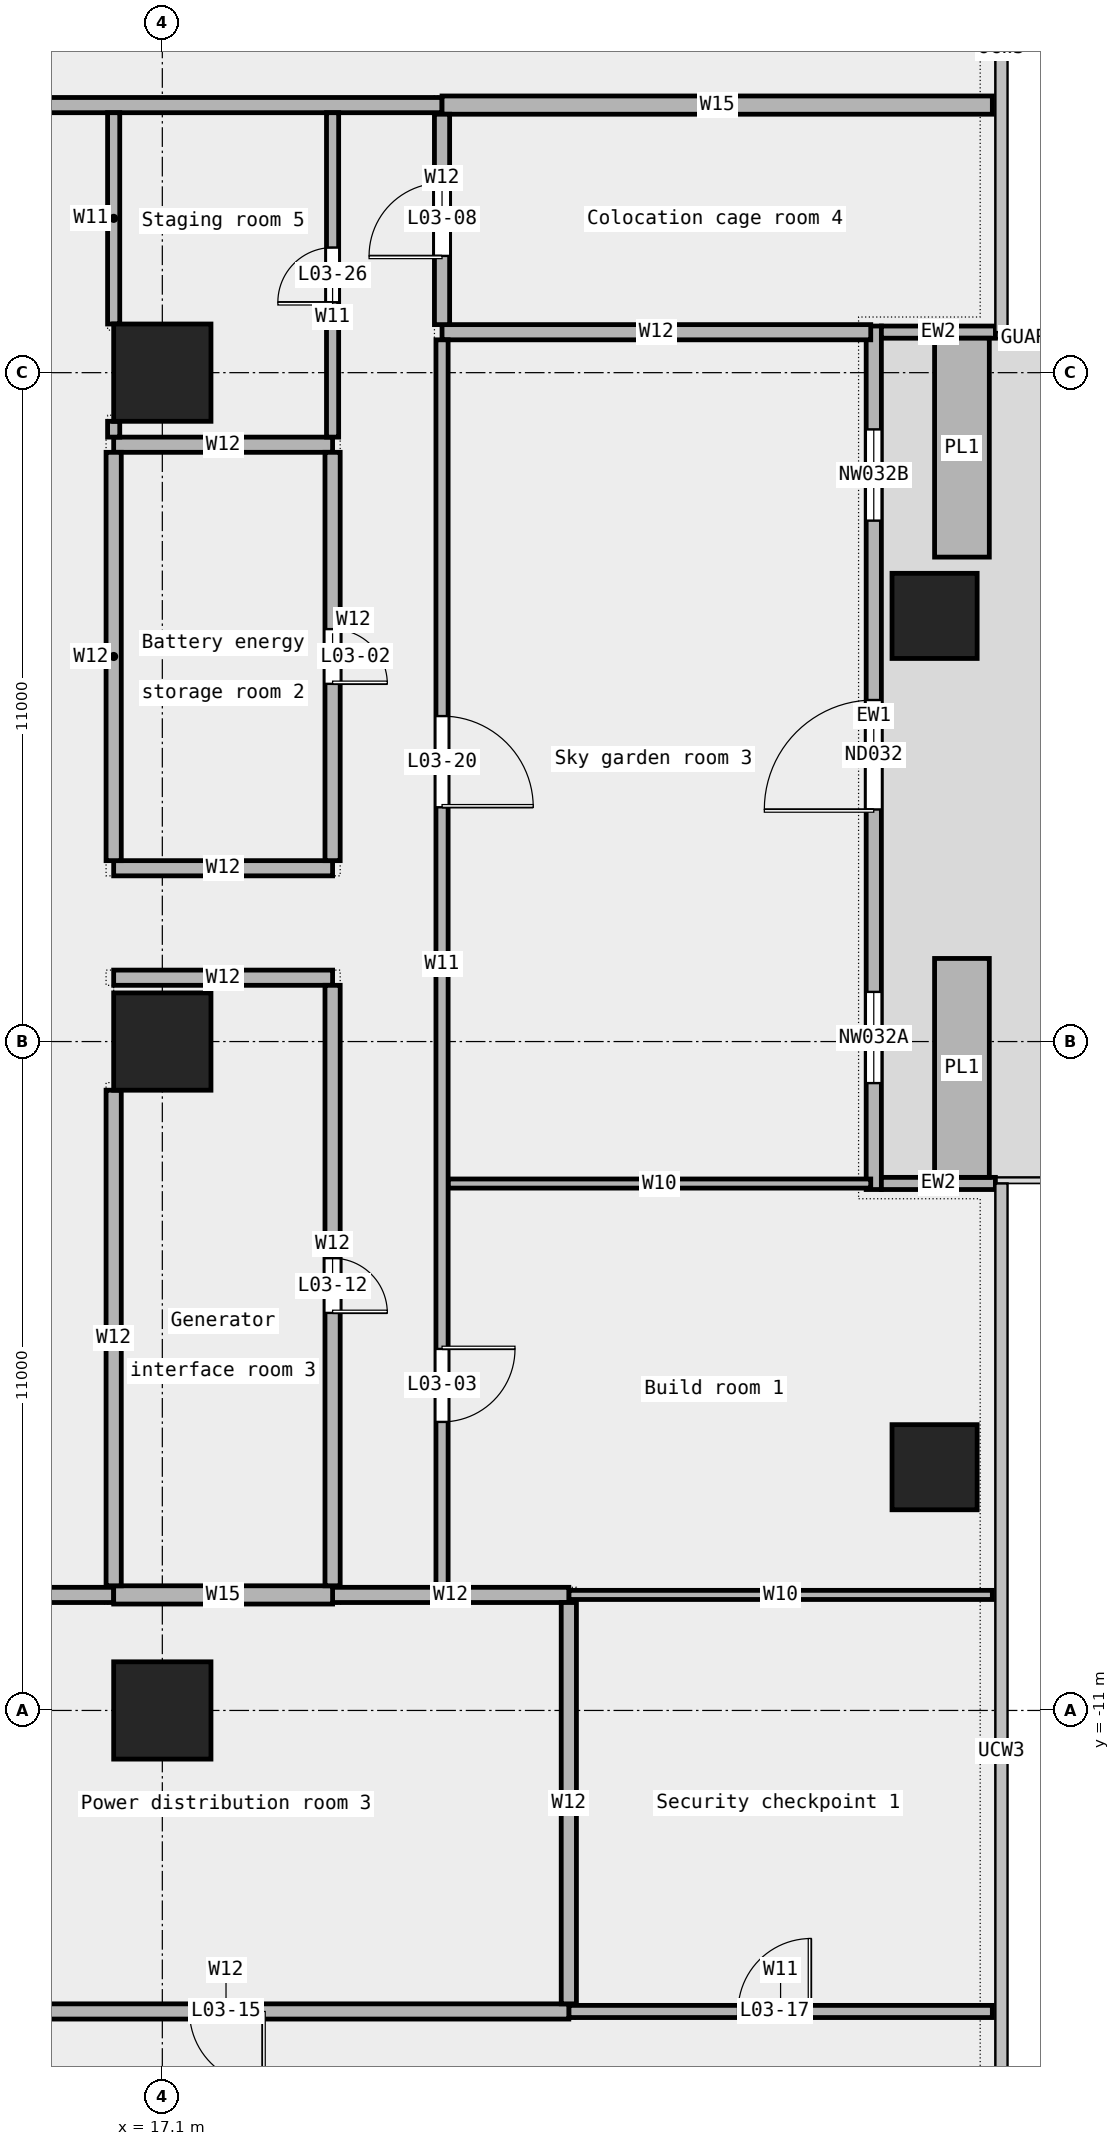
"""IFC4 building model, lengths in metres.
Left out: names, types, materials, properties, quantities, classifications, styles, units other than length and angle.
Written with IfcOpenShell. Run it as: python <this file> out.ifc"""

import sys

from ifc_helpers import new_model, si_unit, direction, frame, frame_2d, origin, origin_2d, place, context, subcontext, project, spatial, rectangle, extrude, element, fill, save


model = new_model("IFC4")
c1 = context("Model", 3, precision=1e-05, world=origin(), true_north=direction((0.0, 1.0)))
c2 = subcontext(c1, "Body", "Model", "MODEL_VIEW")
j1 = project(units=[si_unit("LENGTHUNIT", "METRE"), si_unit("PLANEANGLEUNIT", "RADIAN")], contexts=[c1])
p1 = place(None, origin())
s1 = spatial("IfcSite", under=j1, at=p1, CompositionType="ELEMENT")
p2 = place(p1, origin())
s2 = spatial("IfcBuilding", under=s1, at=p2, CompositionType="ELEMENT")
p3 = place(p2, frame((0.0, 0.0, 20.0)))
s3 = spatial("IfcBuildingStorey", under=s2, at=p3, CompositionType="ELEMENT", Elevation=20.0)
for number, where, z_axis, x_axis in (
    (1, (29.8, -7.0, 0.0), (0.0, 0.0, 1.0), (1.0, 0.0, 0.0)),
    (2, (29.8, 7.0, 0.0), (0.0, 0.0, 1.0), (1.0, 0.0, 0.0)),
):
    element("IfcColumn", number, at=place(p3, frame(where, z_axis=z_axis, x_axis=x_axis)), inside=s3, PredefinedType="COLUMN", context=c2, shape_type="SweptSolid", body=[
        extrude(rectangle(XDim=1.4, YDim=1.4, at=origin_2d()), origin(), (0.0, 0.0, 1.0), 5.0),
    ])
for number, where, z_axis, x_axis in (
    (3, (17.1, -11.0, 0.0), (0.0, 0.0, 1.0), (1.0, 0.0, 0.0)),
    (4, (17.1, 0.0, 0.0), (0.0, 0.0, 1.0), (1.0, 0.0, 0.0)),
    (5, (17.1, 11.0, 0.0), (0.0, 0.0, 1.0), (1.0, 0.0, 0.0)),
):
    element("IfcColumn", number, at=place(p3, frame(where, z_axis=z_axis, x_axis=x_axis)), inside=s3, PredefinedType="COLUMN", context=c2, shape_type="SweptSolid", body=[
        extrude(rectangle(XDim=1.6, YDim=1.6, at=origin_2d()), origin(), (0.0, 0.0, 1.0), 5.0),
    ])
p4 = place(p3, frame((28.8, -2.433, 0.0), z_axis=(0.0, 0.0, 1.0), x_axis=(0.0, 1.0, 0.0)))
e6 = element("IfcWall", 6, at=p4, inside=s3, PredefinedType="STANDARD", context=c2, shape_type="SweptSolid", body=[
    extrude(rectangle(XDim=14.2, YDim=0.25, at=frame_2d((7.1, 0.0))), origin(), (0.0, 0.0, 1.0), 5.0),
])
p5 = place(p4, frame((1.75, 0.0, 0.45)))
e7 = element("IfcOpeningElement", 7, at=p5, cuts=e6, PredefinedType="OPENING", context=c2, shape_type="SweptSolid", body=[
    extrude(rectangle(XDim=1.5, YDim=3.0, at=frame_2d((0.75, 1.5))), frame((0.0, 0.137, 0.0), z_axis=(0.0, -1.0, 0.0), x_axis=(1.0, 0.0, 0.0)), (0.0, 0.0, 1.0), 0.274),
])
p6 = place(p4, frame((6.25, 0.0, 0.0)))
e8 = element("IfcOpeningElement", 8, at=p6, cuts=e6, PredefinedType="OPENING", context=c2, shape_type="SweptSolid", body=[
    extrude(rectangle(XDim=1.8, YDim=2.4, at=frame_2d((0.9, 1.2))), frame((0.0, 0.137, 0.0), z_axis=(0.0, -1.0, 0.0), x_axis=(1.0, 0.0, 0.0)), (0.0, 0.0, 1.0), 0.274),
])
p7 = place(p4, frame((11.0, 0.0, 0.45)))
e9 = element("IfcOpeningElement", 9, at=p7, cuts=e6, PredefinedType="OPENING", context=c2, shape_type="SweptSolid", body=[
    extrude(rectangle(XDim=1.5, YDim=3.0, at=frame_2d((0.75, 1.5))), frame((0.0, 0.137, 0.0), z_axis=(0.0, -1.0, 0.0), x_axis=(1.0, 0.0, 0.0)), (0.0, 0.0, 1.0), 0.274),
])
for number, where, z_axis, x_axis in (
    (10, (30.8, -2.333, 0.0), (0.0, 0.0, 1.0), (-1.0, 0.0, 0.0)),
    (11, (30.8, 11.667, 0.0), (0.0, 0.0, 1.0), (-1.0, 0.0, 0.0)),
):
    element("IfcWall", number, at=place(p3, frame(where, z_axis=z_axis, x_axis=x_axis)), inside=s3, PredefinedType="STANDARD", context=c2, shape_type="SweptSolid", body=[
        extrude(rectangle(XDim=1.875, YDim=0.2, at=frame_2d((0.938, 0.0))), origin(), (0.0, 0.0, 1.0), 5.0),
    ])
for number, where, z_axis, x_axis in (
    (12, (30.25, -2.233, 0.0), (0.0, 0.0, 1.0), (0.0, 1.0, 0.0)),
    (13, (30.25, 7.967, 0.0), (0.0, 0.0, 1.0), (0.0, 1.0, 0.0)),
):
    element("IfcWall", number, at=place(p3, frame(where, z_axis=z_axis, x_axis=x_axis)), inside=s3, PredefinedType="STANDARD", context=c2, shape_type="SweptSolid", body=[
        extrude(rectangle(XDim=3.6, YDim=0.9, at=frame_2d((1.8, 0.0))), origin(), (0.0, 0.0, 1.0), 0.7),
    ])
p8 = place(p3, frame((23.785, -15.95, 0.0), z_axis=(0.0, 0.0, 1.0), x_axis=(1.0, 0.0, 0.0)))
e14 = element("IfcWall", 14, at=p8, inside=s3, PredefinedType="PARTITIONING", context=c2, shape_type="SweptSolid", body=[
    extrude(rectangle(XDim=6.965, YDim=0.2, at=frame_2d((3.482, 0.0))), origin(), (0.0, 0.0, 1.0), 5.0),
])
p9 = place(p8, frame((2.782, 0.0, 0.0)))
e15 = element("IfcOpeningElement", 15, at=p9, cuts=e14, PredefinedType="OPENING", context=c2, shape_type="SweptSolid", body=[
    extrude(rectangle(XDim=1.2, YDim=2.1, at=frame_2d((0.6, 1.05))), frame((0.0, 0.112, 0.0), z_axis=(0.0, -1.0, 0.0), x_axis=(1.0, 0.0, 0.0)), (0.0, 0.0, 1.0), 0.224),
])
p10 = place(p3, frame((12.51, -15.95, 0.0), z_axis=(0.0, 0.0, 1.0), x_axis=(1.0, 0.0, 0.0)))
e16 = element("IfcWall", 16, at=p10, inside=s3, PredefinedType="PARTITIONING", context=c2, shape_type="SweptSolid", body=[
    extrude(rectangle(XDim=11.275, YDim=0.25, at=frame_2d((5.637, 0.0))), origin(), (0.0, 0.0, 1.0), 5.0),
])
p11 = place(p10, frame((5.038, 0.0, 0.0)))
e17 = element("IfcOpeningElement", 17, at=p11, cuts=e16, PredefinedType="OPENING", context=c2, shape_type="SweptSolid", body=[
    extrude(rectangle(XDim=1.2, YDim=2.1, at=frame_2d((0.6, 1.05))), frame((0.0, 0.137, 0.0), z_axis=(0.0, -1.0, 0.0), x_axis=(1.0, 0.0, 0.0)), (0.0, 0.0, 1.0), 0.274),
])
p12 = place(p3, frame((23.785, -9.1, 0.0), z_axis=(0.0, 0.0, 1.0), x_axis=(1.0, 0.0, 0.0)))
e18 = element("IfcWall", 18, at=p12, inside=s3, PredefinedType="PARTITIONING", context=c2, shape_type="SweptSolid", body=[
    extrude(rectangle(XDim=6.965, YDim=0.15, at=frame_2d((3.482, 0.0))), origin(), (0.0, 0.0, 1.0), 5.0),
])
p13 = place(p3, frame((12.51, -9.1, 0.0), z_axis=(0.0, 0.0, 1.0), x_axis=(1.0, 0.0, 0.0)))
e19 = element("IfcWall", 19, at=p13, inside=s3, PredefinedType="PARTITIONING", context=c2, shape_type="SweptSolid", body=[
    extrude(rectangle(XDim=3.79, YDim=0.25, at=frame_2d((1.895, 0.0))), origin(), (0.0, 0.0, 1.0), 5.0),
])
p14 = place(p3, frame((19.9, -9.1, 0.0), z_axis=(0.0, 0.0, 1.0), x_axis=(1.0, 0.0, 0.0)))
e20 = element("IfcWall", 20, at=p14, inside=s3, PredefinedType="PARTITIONING", context=c2, shape_type="SweptSolid", body=[
    extrude(rectangle(XDim=3.885, YDim=0.25, at=frame_2d((1.942, 0.0))), origin(), (0.0, 0.0, 1.0), 5.0),
])
p15 = place(p3, frame((16.3, -9.1, 0.0), z_axis=(0.0, 0.0, 1.0), x_axis=(1.0, 0.0, 0.0)))
e21 = element("IfcWall", 21, at=p15, inside=s3, PredefinedType="PARTITIONING", context=c2, shape_type="SweptSolid", body=[
    extrude(rectangle(XDim=3.6, YDim=0.3, at=frame_2d((1.8, 0.0))), origin(), (0.0, 0.0, 1.0), 5.0),
])
p16 = place(p3, frame((21.8, -2.335, 0.0), z_axis=(0.0, 0.0, 1.0), x_axis=(1.0, 0.0, 0.0)))
e22 = element("IfcWall", 22, at=p16, inside=s3, PredefinedType="PARTITIONING", context=c2, shape_type="SweptSolid", body=[
    extrude(rectangle(XDim=6.95, YDim=0.15, at=frame_2d((3.475, 0.0))), origin(), (0.0, 0.0, 1.0), 5.0),
])
for number, where, z_axis, x_axis in (
    (23, (16.3, 1.05, 0.0), (0.0, 0.0, 1.0), (1.0, 0.0, 0.0)),
    (24, (16.3, 2.85, 0.0), (0.0, 0.0, 1.0), (1.0, 0.0, 0.0)),
    (25, (16.3, 9.815, 0.0), (0.0, 0.0, 1.0), (1.0, 0.0, 0.0)),
):
    element("IfcWall", number, at=place(p3, frame(where, z_axis=z_axis, x_axis=x_axis)), inside=s3, PredefinedType="PARTITIONING", context=c2, shape_type="SweptSolid", body=[
        extrude(rectangle(XDim=3.6, YDim=0.25, at=frame_2d((1.8, 0.0))), origin(), (0.0, 0.0, 1.0), 5.0),
    ])
p17 = place(p3, frame((21.7, 11.665, 0.0), z_axis=(0.0, 0.0, 1.0), x_axis=(1.0, 0.0, 0.0)))
e26 = element("IfcWall", 26, at=p17, inside=s3, PredefinedType="PARTITIONING", context=c2, shape_type="SweptSolid", body=[
    extrude(rectangle(XDim=7.05, YDim=0.25, at=frame_2d((3.525, 0.0))), origin(), (0.0, 0.0, 1.0), 5.0),
])
p18 = place(p3, frame((-1.33, 15.4, 0.0), z_axis=(0.0, 0.0, 1.0), x_axis=(1.0, 0.0, 0.0)))
e27 = element("IfcWall", 27, at=p18, inside=s3, PredefinedType="PARTITIONING", context=c2, shape_type="SweptSolid", body=[
    extrude(rectangle(XDim=23.03, YDim=0.25, at=frame_2d((11.515, 0.0))), origin(), (0.0, 0.0, 1.0), 5.0),
])
p19 = place(p18, frame((3.385, 0.0, 0.0)))
e28 = element("IfcOpeningElement", 28, at=p19, cuts=e27, PredefinedType="OPENING", context=c2, shape_type="SweptSolid", body=[
    extrude(rectangle(XDim=1.2, YDim=2.1, at=frame_2d((0.6, 1.05))), frame((0.0, 0.137, 0.0), z_axis=(0.0, -1.0, 0.0), x_axis=(1.0, 0.0, 0.0)), (0.0, 0.0, 1.0), 0.274),
])
p20 = place(p18, frame((11.9, 0.0, 0.0)))
e29 = element("IfcOpeningElement", 29, at=p20, cuts=e27, PredefinedType="OPENING", context=c2, shape_type="SweptSolid", body=[
    extrude(rectangle(XDim=1.8, YDim=2.1, at=frame_2d((0.9, 1.05))), frame((0.0, 0.137, 0.0), z_axis=(0.0, -1.0, 0.0), x_axis=(1.0, 0.0, 0.0)), (0.0, 0.0, 1.0), 0.274),
])
p21 = place(p3, frame((21.7, 15.4, 0.0), z_axis=(0.0, 0.0, 1.0), x_axis=(1.0, 0.0, 0.0)))
e30 = element("IfcWall", 30, at=p21, inside=s3, PredefinedType="PARTITIONING", context=c2, shape_type="SweptSolid", body=[
    extrude(rectangle(XDim=9.05, YDim=0.3, at=frame_2d((4.525, 0.0))), origin(), (0.0, 0.0, 1.0), 5.0),
])
p22 = place(p3, frame((16.3, 9.94, 0.0), z_axis=(0.0, 0.0, 1.0), x_axis=(0.0, 1.0, 0.0)))
e31 = element("IfcWall", 31, at=p22, inside=s3, PredefinedType="PARTITIONING", context=c2, shape_type="SweptSolid", body=[
    extrude(rectangle(XDim=0.26, YDim=0.2, at=frame_2d((0.13, 0.0))), origin(), (0.0, 0.0, 1.0), 5.0),
])
p23 = place(p3, frame((16.3, 11.8, 0.0), z_axis=(0.0, 0.0, 1.0), x_axis=(0.0, 1.0, 0.0)))
e32 = element("IfcWall", 32, at=p23, inside=s3, PredefinedType="PARTITIONING", context=c2, shape_type="SweptSolid", body=[
    extrude(rectangle(XDim=3.475, YDim=0.2, at=frame_2d((1.737, 0.0))), origin(), (0.0, 0.0, 1.0), 5.0),
])
p24 = place(p3, frame((16.3, -8.95, 0.0), z_axis=(0.0, 0.0, 1.0), x_axis=(0.0, 1.0, 0.0)))
e33 = element("IfcWall", 33, at=p24, inside=s3, PredefinedType="PARTITIONING", context=c2, shape_type="SweptSolid", body=[
    extrude(rectangle(XDim=8.15, YDim=0.25, at=frame_2d((4.075, 0.0))), origin(), (0.0, 0.0, 1.0), 5.0),
])
p25 = place(p3, frame((16.3, 2.975, 0.0), z_axis=(0.0, 0.0, 1.0), x_axis=(0.0, 1.0, 0.0)))
e34 = element("IfcWall", 34, at=p25, inside=s3, PredefinedType="PARTITIONING", context=c2, shape_type="SweptSolid", body=[
    extrude(rectangle(XDim=6.715, YDim=0.25, at=frame_2d((3.357, 0.0))), origin(), (0.0, 0.0, 1.0), 5.0),
])
p26 = place(p3, frame((19.9, 9.94, 0.0), z_axis=(0.0, 0.0, 1.0), x_axis=(0.0, 1.0, 0.0)))
e35 = element("IfcWall", 35, at=p26, inside=s3, PredefinedType="PARTITIONING", context=c2, shape_type="SweptSolid", body=[
    extrude(rectangle(XDim=5.335, YDim=0.2, at=frame_2d((2.667, 0.0))), origin(), (0.0, 0.0, 1.0), 5.0),
])
p27 = place(p26, frame((2.218, 0.0, 0.0)))
e36 = element("IfcOpeningElement", 36, at=p27, cuts=e35, PredefinedType="OPENING", context=c2, shape_type="SweptSolid", body=[
    extrude(rectangle(XDim=0.9, YDim=2.1, at=frame_2d((0.45, 1.05))), frame((0.0, 0.112, 0.0), z_axis=(0.0, -1.0, 0.0), x_axis=(1.0, 0.0, 0.0)), (0.0, 0.0, 1.0), 0.224),
])
p28 = place(p3, frame((19.9, -8.95, 0.0), z_axis=(0.0, 0.0, 1.0), x_axis=(0.0, 1.0, 0.0)))
e37 = element("IfcWall", 37, at=p28, inside=s3, PredefinedType="PARTITIONING", context=c2, shape_type="SweptSolid", body=[
    extrude(rectangle(XDim=9.875, YDim=0.25, at=frame_2d((4.938, 0.0))), origin(), (0.0, 0.0, 1.0), 5.0),
])
p29 = place(p28, frame((4.488, 0.0, 0.0)))
e38 = element("IfcOpeningElement", 38, at=p29, cuts=e37, PredefinedType="OPENING", context=c2, shape_type="SweptSolid", body=[
    extrude(rectangle(XDim=0.9, YDim=2.1, at=frame_2d((0.45, 1.05))), frame((0.0, 0.137, 0.0), z_axis=(0.0, -1.0, 0.0), x_axis=(1.0, 0.0, 0.0)), (0.0, 0.0, 1.0), 0.274),
])
p30 = place(p3, frame((19.9, 2.975, 0.0), z_axis=(0.0, 0.0, 1.0), x_axis=(0.0, 1.0, 0.0)))
e39 = element("IfcWall", 39, at=p30, inside=s3, PredefinedType="PARTITIONING", context=c2, shape_type="SweptSolid", body=[
    extrude(rectangle(XDim=6.715, YDim=0.25, at=frame_2d((3.357, 0.0))), origin(), (0.0, 0.0, 1.0), 5.0),
])
p31 = place(p30, frame((2.907, 0.0, 0.0)))
e40 = element("IfcOpeningElement", 40, at=p31, cuts=e39, PredefinedType="OPENING", context=c2, shape_type="SweptSolid", body=[
    extrude(rectangle(XDim=0.9, YDim=2.1, at=frame_2d((0.45, 1.05))), frame((0.0, 0.137, 0.0), z_axis=(0.0, -1.0, 0.0), x_axis=(1.0, 0.0, 0.0)), (0.0, 0.0, 1.0), 0.274),
])
p32 = place(p3, frame((21.7, -8.975, 0.0), z_axis=(0.0, 0.0, 1.0), x_axis=(0.0, 1.0, 0.0)))
e41 = element("IfcWall", 41, at=p32, inside=s3, PredefinedType="PARTITIONING", context=c2, shape_type="SweptSolid", body=[
    extrude(rectangle(XDim=20.515, YDim=0.2, at=frame_2d((10.258, 0.0))), origin(), (0.0, 0.0, 1.0), 5.0),
])
p33 = place(p32, frame((2.72, 0.0, 0.0)))
e42 = element("IfcOpeningElement", 42, at=p33, cuts=e41, PredefinedType="OPENING", context=c2, shape_type="SweptSolid", body=[
    extrude(rectangle(XDim=1.2, YDim=2.1, at=frame_2d((0.6, 1.05))), frame((0.0, 0.112, 0.0), z_axis=(0.0, -1.0, 0.0), x_axis=(1.0, 0.0, 0.0)), (0.0, 0.0, 1.0), 0.224),
])
p34 = place(p32, frame((12.827, 0.0, 0.0)))
e43 = element("IfcOpeningElement", 43, at=p34, cuts=e41, PredefinedType="OPENING", context=c2, shape_type="SweptSolid", body=[
    extrude(rectangle(XDim=1.5, YDim=2.1, at=frame_2d((0.75, 1.05))), frame((0.0, 0.112, 0.0), z_axis=(0.0, -1.0, 0.0), x_axis=(1.0, 0.0, 0.0)), (0.0, 0.0, 1.0), 0.224),
])
p35 = place(p3, frame((21.7, 11.79, 0.0), z_axis=(0.0, 0.0, 1.0), x_axis=(0.0, 1.0, 0.0)))
e44 = element("IfcWall", 44, at=p35, inside=s3, PredefinedType="PARTITIONING", context=c2, shape_type="SweptSolid", body=[
    extrude(rectangle(XDim=3.46, YDim=0.25, at=frame_2d((1.73, 0.0))), origin(), (0.0, 0.0, 1.0), 5.0),
])
p36 = place(p35, frame((1.13, 0.0, 0.0)))
e45 = element("IfcOpeningElement", 45, at=p36, cuts=e44, PredefinedType="OPENING", context=c2, shape_type="SweptSolid", body=[
    extrude(rectangle(XDim=1.2, YDim=2.1, at=frame_2d((0.6, 1.05))), frame((0.0, 0.137, 0.0), z_axis=(0.0, -1.0, 0.0), x_axis=(1.0, 0.0, 0.0)), (0.0, 0.0, 1.0), 0.274),
])
p37 = place(p3, frame((23.785, -15.825, 0.0), z_axis=(0.0, 0.0, 1.0), x_axis=(0.0, 1.0, 0.0)))
e46 = element("IfcWall", 46, at=p37, inside=s3, PredefinedType="PARTITIONING", context=c2, shape_type="SweptSolid", body=[
    extrude(rectangle(XDim=6.6, YDim=0.25, at=frame_2d((3.3, 0.0))), origin(), (0.0, 0.0, 1.0), 5.0),
])
p38 = place(p5, origin())
e47 = element("IfcWindow", 47, at=p38, inside=s3, PartitioningType="SINGLE_PANEL", PredefinedType="WINDOW", context=c2, shape_type="SweptSolid", body=[
    extrude(rectangle(XDim=1.5, YDim=3.0, at=frame_2d((0.75, 1.5))), frame((0.0, 0.03, 0.0), z_axis=(0.0, -1.0, 0.0), x_axis=(1.0, 0.0, 0.0)), (0.0, 0.0, 1.0), 0.06),
])
fill(e7, e47)
p39 = place(p6, origin())
e48 = element("IfcDoor", 48, at=p39, inside=s3, OperationType="DOUBLE_DOOR_SINGLE_SWING", PredefinedType="DOOR", context=c2, shape_type="SweptSolid", body=[
    extrude(rectangle(XDim=1.8, YDim=2.4, at=frame_2d((0.9, 1.2))), frame((0.0, 0.025, 0.0), z_axis=(0.0, -1.0, 0.0), x_axis=(1.0, 0.0, 0.0)), (0.0, 0.0, 1.0), 0.05),
])
fill(e8, e48)
p40 = place(p7, origin())
e49 = element("IfcWindow", 49, at=p40, inside=s3, PartitioningType="SINGLE_PANEL", PredefinedType="WINDOW", context=c2, shape_type="SweptSolid", body=[
    extrude(rectangle(XDim=1.5, YDim=3.0, at=frame_2d((0.75, 1.5))), frame((0.0, 0.03, 0.0), z_axis=(0.0, -1.0, 0.0), x_axis=(1.0, 0.0, 0.0)), (0.0, 0.0, 1.0), 0.06),
])
fill(e9, e49)
p41 = place(p31, origin())
e50 = element("IfcDoor", 50, at=p41, inside=s3, OperationType="SINGLE_SWING_RIGHT", PredefinedType="DOOR", context=c2, shape_type="SweptSolid", body=[
    extrude(rectangle(XDim=0.9, YDim=2.1, at=frame_2d((0.45, 1.05))), frame((0.0, 0.025, 0.0), z_axis=(0.0, -1.0, 0.0), x_axis=(1.0, 0.0, 0.0)), (0.0, 0.0, 1.0), 0.05),
])
fill(e40, e50)
p42 = place(p33, origin())
e51 = element("IfcDoor", 51, at=p42, inside=s3, OperationType="SINGLE_SWING_LEFT", PredefinedType="DOOR", context=c2, shape_type="SweptSolid", body=[
    extrude(rectangle(XDim=1.2, YDim=2.1, at=frame_2d((0.6, 1.05))), frame((0.0, 0.025, 0.0), z_axis=(0.0, -1.0, 0.0), x_axis=(1.0, 0.0, 0.0)), (0.0, 0.0, 1.0), 0.05),
])
fill(e42, e51)
p43 = place(p36, origin())
e52 = element("IfcDoor", 52, at=p43, inside=s3, OperationType="SINGLE_SWING_LEFT", PredefinedType="DOOR", context=c2, shape_type="SweptSolid", body=[
    extrude(rectangle(XDim=1.2, YDim=2.1, at=frame_2d((0.6, 1.05))), frame((0.0, 0.025, 0.0), z_axis=(0.0, -1.0, 0.0), x_axis=(1.0, 0.0, 0.0)), (0.0, 0.0, 1.0), 0.05),
])
fill(e45, e52)
p44 = place(p29, origin())
e53 = element("IfcDoor", 53, at=p44, inside=s3, OperationType="SINGLE_SWING_RIGHT", PredefinedType="DOOR", context=c2, shape_type="SweptSolid", body=[
    extrude(rectangle(XDim=0.9, YDim=2.1, at=frame_2d((0.45, 1.05))), frame((0.0, 0.025, 0.0), z_axis=(0.0, -1.0, 0.0), x_axis=(1.0, 0.0, 0.0)), (0.0, 0.0, 1.0), 0.05),
])
fill(e38, e53)
p45 = place(p11, origin())
e54 = element("IfcDoor", 54, at=p45, inside=s3, OperationType="SINGLE_SWING_LEFT", PredefinedType="DOOR", context=c2, shape_type="SweptSolid", body=[
    extrude(rectangle(XDim=1.2, YDim=2.1, at=frame_2d((0.6, 1.05))), frame((0.0, 0.025, 0.0), z_axis=(0.0, -1.0, 0.0), x_axis=(1.0, 0.0, 0.0)), (0.0, 0.0, 1.0), 0.05),
])
fill(e17, e54)
p46 = place(p9, origin())
e55 = element("IfcDoor", 55, at=p46, inside=s3, OperationType="SINGLE_SWING_RIGHT", PredefinedType="DOOR", context=c2, shape_type="SweptSolid", body=[
    extrude(rectangle(XDim=1.2, YDim=2.1, at=frame_2d((0.6, 1.05))), frame((0.0, 0.025, 0.0), z_axis=(0.0, -1.0, 0.0), x_axis=(1.0, 0.0, 0.0)), (0.0, 0.0, 1.0), 0.05),
])
fill(e15, e55)
p47 = place(p34, origin())
e56 = element("IfcDoor", 56, at=p47, inside=s3, OperationType="DOUBLE_DOOR_SINGLE_SWING", PredefinedType="DOOR", context=c2, shape_type="SweptSolid", body=[
    extrude(rectangle(XDim=1.5, YDim=2.1, at=frame_2d((0.75, 1.05))), frame((0.0, 0.025, 0.0), z_axis=(0.0, -1.0, 0.0), x_axis=(1.0, 0.0, 0.0)), (0.0, 0.0, 1.0), 0.05),
])
fill(e43, e56)
p48 = place(p27, origin())
e57 = element("IfcDoor", 57, at=p48, inside=s3, OperationType="SINGLE_SWING_LEFT", PredefinedType="DOOR", context=c2, shape_type="SweptSolid", body=[
    extrude(rectangle(XDim=0.9, YDim=2.1, at=frame_2d((0.45, 1.05))), frame((0.0, 0.025, 0.0), z_axis=(0.0, -1.0, 0.0), x_axis=(1.0, 0.0, 0.0)), (0.0, 0.0, 1.0), 0.05),
])
fill(e36, e57)
save(model, sys.argv[1])
